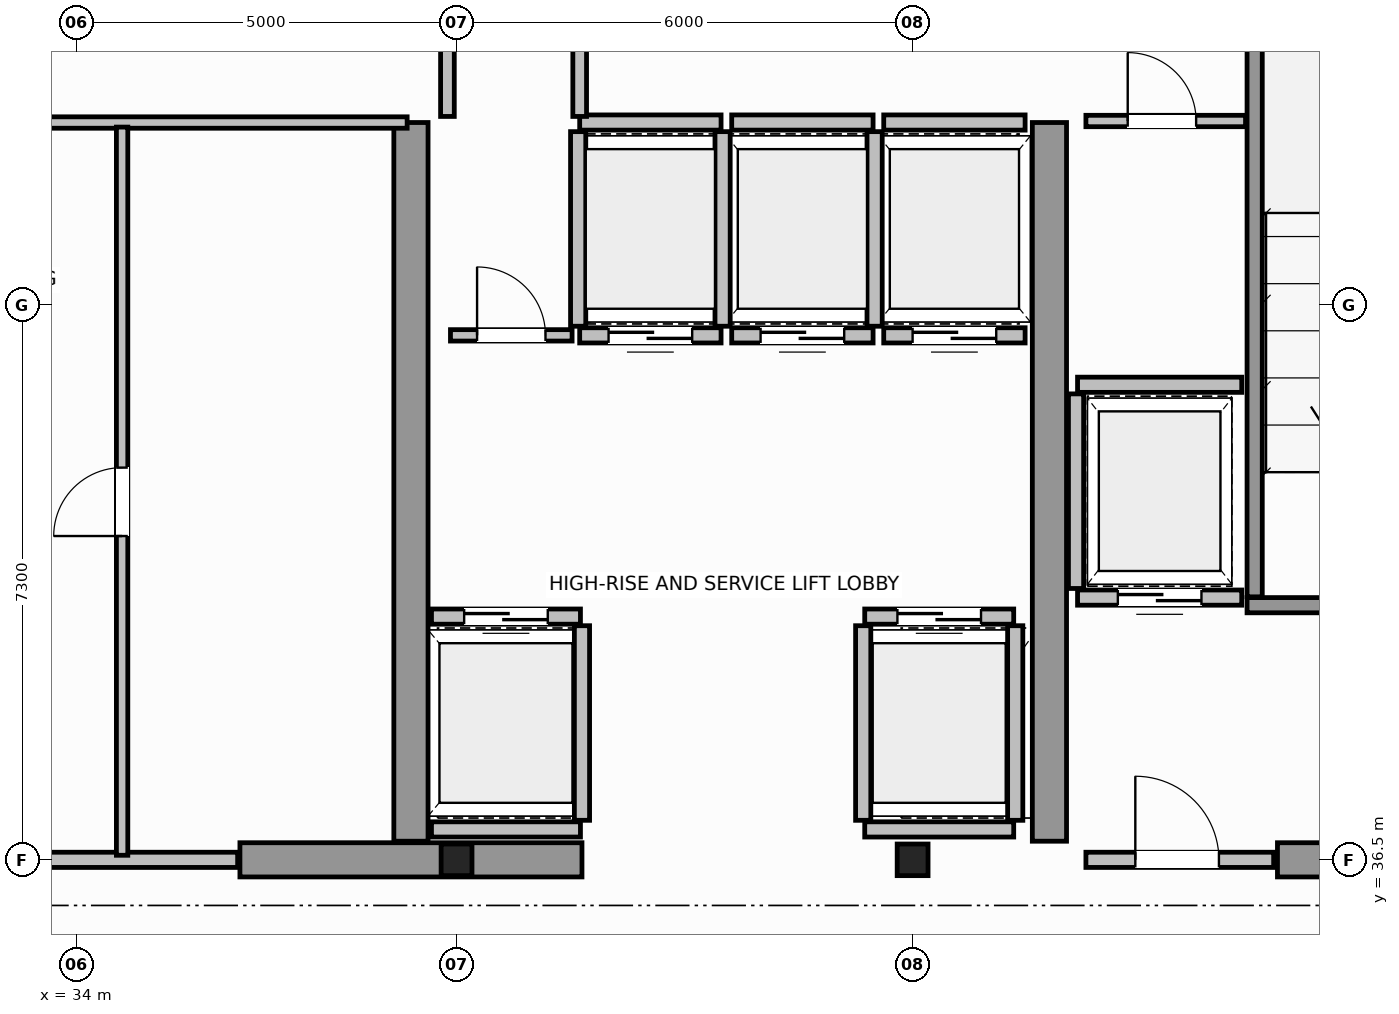
"""IFC4 building model, lengths in metres.
Left out: names, types, materials, properties, quantities, classifications, styles, units other than length and angle.
Written with IfcOpenShell. Run it as: python <this file> out.ifc"""

import sys

from ifc_helpers import new_model, si_unit, direction, frame, frame_2d, origin, origin_2d, place, context, subcontext, project, spatial, rectangle, i_section, extrude, source, transform, mapped, element, fill, save


model = new_model("IFC4")
c1 = context("Model", 3, precision=1e-05, world=origin(), true_north=direction((0.0, 1.0)))
c2 = subcontext(c1, "Body", "Model", "MODEL_VIEW")
j1 = project(units=[si_unit("LENGTHUNIT", "METRE"), si_unit("PLANEANGLEUNIT", "RADIAN")], contexts=[c1])
p1 = place(None, origin())
s1 = spatial("IfcSite", under=j1, at=p1, CompositionType="ELEMENT")
p2 = place(p1, origin())
s2 = spatial("IfcBuilding", under=s1, at=p2, CompositionType="ELEMENT")
p3 = place(p2, frame((0.0, 0.0, 276.4)))
s3 = spatial("IfcBuildingStorey", under=s2, at=p3, CompositionType="ELEMENT", Elevation=276.4)
m1 = source(origin(), c2, "Body", "SweptSolid", [
    extrude(i_section(OverallWidth=0.406, OverallDepth=0.416, WebThickness=0.03, FlangeThickness=0.042, FilletRadius=0.015, at=origin_2d()), origin(), (0.0, 0.0, 1.0), 3.8),
])
for number, where, z_axis, x_axis in (
    (1, (39.0, 36.5, 0.0), (0.0, 0.0, 1.0), (1.0, 0.0, 0.0)),
    (2, (45.0, 36.5, 0.0), (0.0, 0.0, 1.0), (1.0, 0.0, 0.0)),
):
    element("IfcColumn", number, at=place(p3, frame(where, z_axis=z_axis, x_axis=x_axis)), inside=s3, PredefinedType="COLUMN", context=c2, shape_type="MappedRepresentation", body=[
        mapped(m1, transform((0.0, 0.0, 0.0), scale=1.0)),
    ])
p4 = place(p3, frame((36.15, 36.5, 0.0), z_axis=(0.0, 0.0, 1.0), x_axis=(1.0, 0.0, 0.0)))
e3 = element("IfcWall", 3, at=p4, inside=s3, PredefinedType="SHEAR", context=c2, shape_type="SweptSolid", body=[
    extrude(rectangle(XDim=4.5, YDim=0.45, at=frame_2d((2.25, 0.0))), origin(), (0.0, 0.0, 1.0), 3.8),
])
p5 = place(p3, frame((49.8, 36.5, 0.0), z_axis=(0.0, 0.0, 1.0), x_axis=(1.0, 0.0, 0.0)))
e4 = element("IfcWall", 4, at=p5, inside=s3, PredefinedType="SHEAR", context=c2, shape_type="SweptSolid", body=[
    extrude(rectangle(XDim=3.955, YDim=0.45, at=frame_2d((1.978, 0.0))), origin(), (0.0, 0.0, 1.0), 2.58),
])
for number, where, z_axis, x_axis in (
    (5, (38.4, 36.745, 0.0), (0.0, 0.0, 1.0), (0.0, 1.0, 0.0)),
    (6, (46.8, 36.745, 0.0), (0.0, 0.0, 1.0), (0.0, 1.0, 0.0)),
):
    element("IfcWall", number, at=place(p3, frame(where, z_axis=z_axis, x_axis=x_axis)), inside=s3, PredefinedType="SHEAR", context=c2, shape_type="SweptSolid", body=[
        extrude(rectangle(XDim=9.455, YDim=0.45, at=frame_2d((4.728, 0.0))), origin(), (0.0, 0.0, 1.0), 3.8),
    ])
p6 = place(p3, frame((49.4, 39.85, 0.0), z_axis=(0.0, 0.0, 1.0), x_axis=(1.0, 0.0, 0.0)))
e7 = element("IfcWall", 7, at=p6, inside=s3, PredefinedType="SOLIDWALL", context=c2, shape_type="SweptSolid", body=[
    extrude(rectangle(XDim=4.375, YDim=0.2, at=frame_2d((2.188, 0.0))), origin(), (0.0, 0.0, 1.0), 3.8),
])
p7 = place(p6, frame((1.325, 0.0, 0.0)))
e8 = element("IfcOpeningElement", 8, at=p7, cuts=e7, PredefinedType="OPENING", context=c2, shape_type="SweptSolid", body=[
    extrude(rectangle(XDim=1.1, YDim=2.15, at=frame_2d((0.55, 1.075))), frame((0.0, 0.11, 0.0), z_axis=(0.0, -1.0, 0.0), x_axis=(1.0, 0.0, 0.0)), (0.0, 0.0, 1.0), 0.22),
])
p8 = place(p3, frame((49.5, 39.96, 0.0), z_axis=(0.0, 0.0, 1.0), x_axis=(0.0, 1.0, 0.0)))
e9 = element("IfcWall", 9, at=p8, inside=s3, PredefinedType="SOLIDWALL", context=c2, shape_type="SweptSolid", body=[
    extrude(rectangle(XDim=9.93, YDim=0.2, at=frame_2d((4.965, 0.0))), origin(), (0.0, 0.0, 1.0), 3.8),
])
p9 = place(p3, frame((47.28, 36.5, 0.0), z_axis=(0.0, 0.0, 1.0), x_axis=(1.0, 0.0, 0.0)))
e10 = element("IfcWall", 10, at=p9, inside=s3, PredefinedType="SOLIDWALL", context=c2, shape_type="SweptSolid", body=[
    extrude(rectangle(XDim=2.47, YDim=0.2, at=frame_2d((1.235, 0.0))), origin(), (0.0, 0.0, 1.0), 2.57),
])
p10 = place(p9, frame((0.65, 0.0, 0.0)))
e11 = element("IfcOpeningElement", 11, at=p10, cuts=e10, PredefinedType="OPENING", context=c2, shape_type="SweptSolid", body=[
    extrude(rectangle(XDim=1.1, YDim=2.15, at=frame_2d((0.55, 1.075))), frame((0.0, 0.11, 0.0), z_axis=(0.0, -1.0, 0.0), x_axis=(1.0, 0.0, 0.0)), (0.0, 0.0, 1.0), 0.22),
])
p11 = place(p3, frame((38.67, 39.7, 0.0), z_axis=(0.0, 0.0, 1.0), x_axis=(1.0, 0.0, 0.0)))
e12 = element("IfcWall", 12, at=p11, inside=s3, PredefinedType="SOLIDWALL", context=c2, shape_type="SweptSolid", body=[
    extrude(rectangle(XDim=1.96, YDim=0.2, at=frame_2d((0.98, 0.0))), origin(), (0.0, 0.0, 1.0), 3.58),
])
p12 = place(p11, frame((0.43, 0.0, 0.0)))
e13 = element("IfcOpeningElement", 13, at=p12, cuts=e12, PredefinedType="OPENING", context=c2, shape_type="SweptSolid", body=[
    extrude(rectangle(XDim=1.1, YDim=2.15, at=frame_2d((0.55, 1.075))), frame((0.0, 0.11, 0.0), z_axis=(0.0, -1.0, 0.0), x_axis=(1.0, 0.0, 0.0)), (0.0, 0.0, 1.0), 0.22),
])
p13 = place(p3, frame((38.67, 36.9, 0.0), z_axis=(0.0, 0.0, 1.0), x_axis=(1.0, 0.0, 0.0)))
e14 = element("IfcWall", 14, at=p13, inside=s3, PredefinedType="SOLIDWALL", context=c2, shape_type="SweptSolid", body=[
    extrude(rectangle(XDim=1.96, YDim=0.2, at=frame_2d((0.98, 0.0))), origin(), (0.0, 0.0, 1.0), 3.58),
])
p14 = place(p3, frame((40.65, 37.02, 0.0), z_axis=(0.0, 0.0, 1.0), x_axis=(0.0, 1.0, 0.0)))
e15 = element("IfcWall", 15, at=p14, inside=s3, PredefinedType="SOLIDWALL", context=c2, shape_type="SweptSolid", body=[
    extrude(rectangle(XDim=2.56, YDim=0.2, at=frame_2d((1.28, 0.0))), origin(), (0.0, 0.0, 1.0), 3.58),
])
p15 = place(p3, frame((44.37, 39.7, 0.0), z_axis=(0.0, 0.0, 1.0), x_axis=(1.0, 0.0, 0.0)))
e16 = element("IfcWall", 16, at=p15, inside=s3, PredefinedType="SOLIDWALL", context=c2, shape_type="SweptSolid", body=[
    extrude(rectangle(XDim=1.96, YDim=0.2, at=frame_2d((0.98, 0.0))), origin(), (0.0, 0.0, 1.0), 3.58),
])
p16 = place(p15, frame((0.43, 0.0, 0.0)))
e17 = element("IfcOpeningElement", 17, at=p16, cuts=e16, PredefinedType="OPENING", context=c2, shape_type="SweptSolid", body=[
    extrude(rectangle(XDim=1.1, YDim=2.15, at=frame_2d((0.55, 1.075))), frame((0.0, 0.11, 0.0), z_axis=(0.0, -1.0, 0.0), x_axis=(1.0, 0.0, 0.0)), (0.0, 0.0, 1.0), 0.22),
])
p17 = place(p3, frame((44.37, 36.9, 0.0), z_axis=(0.0, 0.0, 1.0), x_axis=(1.0, 0.0, 0.0)))
e18 = element("IfcWall", 18, at=p17, inside=s3, PredefinedType="SOLIDWALL", context=c2, shape_type="SweptSolid", body=[
    extrude(rectangle(XDim=1.96, YDim=0.2, at=frame_2d((0.98, 0.0))), origin(), (0.0, 0.0, 1.0), 2.57),
])
for number, where, z_axis, x_axis in (
    (19, (44.35, 37.02, 0.0), (0.0, 0.0, 1.0), (0.0, 1.0, 0.0)),
    (20, (46.35, 37.02, 0.0), (0.0, 0.0, 1.0), (0.0, 1.0, 0.0)),
):
    element("IfcWall", number, at=place(p3, frame(where, z_axis=z_axis, x_axis=x_axis)), inside=s3, PredefinedType="SOLIDWALL", context=c2, shape_type="SweptSolid", body=[
        extrude(rectangle(XDim=2.56, YDim=0.2, at=frame_2d((1.28, 0.0))), origin(), (0.0, 0.0, 1.0), 3.58),
    ])
p18 = place(p3, frame((40.62, 43.4, 0.0), z_axis=(0.0, 0.0, 1.0), x_axis=(1.0, 0.0, 0.0)))
e21 = element("IfcWall", 21, at=p18, inside=s3, PredefinedType="SOLIDWALL", context=c2, shape_type="SweptSolid", body=[
    extrude(rectangle(XDim=1.86, YDim=0.2, at=frame_2d((0.93, 0.0))), origin(), (0.0, 0.0, 1.0), 3.58),
])
p19 = place(p18, frame((0.38, 0.0, 0.0)))
e22 = element("IfcOpeningElement", 22, at=p19, cuts=e21, PredefinedType="OPENING", context=c2, shape_type="SweptSolid", body=[
    extrude(rectangle(XDim=1.1, YDim=2.15, at=frame_2d((0.55, 1.075))), frame((0.0, 0.11, 0.0), z_axis=(0.0, -1.0, 0.0), x_axis=(1.0, 0.0, 0.0)), (0.0, 0.0, 1.0), 0.22),
])
p20 = place(p3, frame((40.62, 46.2, 0.0), z_axis=(0.0, 0.0, 1.0), x_axis=(1.0, 0.0, 0.0)))
e23 = element("IfcWall", 23, at=p20, inside=s3, PredefinedType="SOLIDWALL", context=c2, shape_type="SweptSolid", body=[
    extrude(rectangle(XDim=1.86, YDim=0.2, at=frame_2d((0.93, 0.0))), origin(), (0.0, 0.0, 1.0), 3.58),
])
for number, where, z_axis, x_axis in (
    (24, (40.6, 43.52, 0.0), (0.0, 0.0, 1.0), (0.0, 1.0, 0.0)),
    (25, (42.5, 43.52, 0.0), (0.0, 0.0, 1.0), (0.0, 1.0, 0.0)),
):
    element("IfcWall", number, at=place(p3, frame(where, z_axis=z_axis, x_axis=x_axis)), inside=s3, PredefinedType="SOLIDWALL", context=c2, shape_type="SweptSolid", body=[
        extrude(rectangle(XDim=2.56, YDim=0.2, at=frame_2d((1.28, 0.0))), origin(), (0.0, 0.0, 1.0), 3.58),
    ])
p21 = place(p3, frame((42.62, 43.4, 0.0), z_axis=(0.0, 0.0, 1.0), x_axis=(1.0, 0.0, 0.0)))
e26 = element("IfcWall", 26, at=p21, inside=s3, PredefinedType="SOLIDWALL", context=c2, shape_type="SweptSolid", body=[
    extrude(rectangle(XDim=1.86, YDim=0.2, at=frame_2d((0.93, 0.0))), origin(), (0.0, 0.0, 1.0), 3.58),
])
p22 = place(p21, frame((0.38, 0.0, 0.0)))
e27 = element("IfcOpeningElement", 27, at=p22, cuts=e26, PredefinedType="OPENING", context=c2, shape_type="SweptSolid", body=[
    extrude(rectangle(XDim=1.1, YDim=2.15, at=frame_2d((0.55, 1.075))), frame((0.0, 0.11, 0.0), z_axis=(0.0, -1.0, 0.0), x_axis=(1.0, 0.0, 0.0)), (0.0, 0.0, 1.0), 0.22),
])
p23 = place(p3, frame((42.62, 46.2, 0.0), z_axis=(0.0, 0.0, 1.0), x_axis=(1.0, 0.0, 0.0)))
e28 = element("IfcWall", 28, at=p23, inside=s3, PredefinedType="SOLIDWALL", context=c2, shape_type="SweptSolid", body=[
    extrude(rectangle(XDim=1.86, YDim=0.2, at=frame_2d((0.93, 0.0))), origin(), (0.0, 0.0, 1.0), 3.58),
])
p24 = place(p3, frame((44.5, 43.52, 0.0), z_axis=(0.0, 0.0, 1.0), x_axis=(0.0, 1.0, 0.0)))
e29 = element("IfcWall", 29, at=p24, inside=s3, PredefinedType="SOLIDWALL", context=c2, shape_type="SweptSolid", body=[
    extrude(rectangle(XDim=2.56, YDim=0.2, at=frame_2d((1.28, 0.0))), origin(), (0.0, 0.0, 1.0), 3.58),
])
p25 = place(p3, frame((44.62, 43.4, 0.0), z_axis=(0.0, 0.0, 1.0), x_axis=(1.0, 0.0, 0.0)))
e30 = element("IfcWall", 30, at=p25, inside=s3, PredefinedType="SOLIDWALL", context=c2, shape_type="SweptSolid", body=[
    extrude(rectangle(XDim=1.86, YDim=0.2, at=frame_2d((0.93, 0.0))), origin(), (0.0, 0.0, 1.0), 3.58),
])
p26 = place(p25, frame((0.38, 0.0, 0.0)))
e31 = element("IfcOpeningElement", 31, at=p26, cuts=e30, PredefinedType="OPENING", context=c2, shape_type="SweptSolid", body=[
    extrude(rectangle(XDim=1.1, YDim=2.15, at=frame_2d((0.55, 1.075))), frame((0.0, 0.11, 0.0), z_axis=(0.0, -1.0, 0.0), x_axis=(1.0, 0.0, 0.0)), (0.0, 0.0, 1.0), 0.22),
])
p27 = place(p3, frame((44.62, 46.2, 0.0), z_axis=(0.0, 0.0, 1.0), x_axis=(1.0, 0.0, 0.0)))
e32 = element("IfcWall", 32, at=p27, inside=s3, PredefinedType="SOLIDWALL", context=c2, shape_type="SweptSolid", body=[
    extrude(rectangle(XDim=1.86, YDim=0.2, at=frame_2d((0.93, 0.0))), origin(), (0.0, 0.0, 1.0), 3.58),
])
p28 = place(p3, frame((47.17, 39.95, 0.0), z_axis=(0.0, 0.0, 1.0), x_axis=(1.0, 0.0, 0.0)))
e33 = element("IfcWall", 33, at=p28, inside=s3, PredefinedType="SOLIDWALL", context=c2, shape_type="SweptSolid", body=[
    extrude(rectangle(XDim=2.16, YDim=0.2, at=frame_2d((1.08, 0.0))), origin(), (0.0, 0.0, 1.0), 3.58),
])
p29 = place(p28, frame((0.53, 0.0, 0.0)))
e34 = element("IfcOpeningElement", 34, at=p29, cuts=e33, PredefinedType="OPENING", context=c2, shape_type="SweptSolid", body=[
    extrude(rectangle(XDim=1.1, YDim=2.15, at=frame_2d((0.55, 1.075))), frame((0.0, 0.11, 0.0), z_axis=(0.0, -1.0, 0.0), x_axis=(1.0, 0.0, 0.0)), (0.0, 0.0, 1.0), 0.22),
])
p30 = place(p3, frame((47.17, 42.75, 0.0), z_axis=(0.0, 0.0, 1.0), x_axis=(1.0, 0.0, 0.0)))
e35 = element("IfcWall", 35, at=p30, inside=s3, PredefinedType="SOLIDWALL", context=c2, shape_type="SweptSolid", body=[
    extrude(rectangle(XDim=2.16, YDim=0.2, at=frame_2d((1.08, 0.0))), origin(), (0.0, 0.0, 1.0), 3.58),
])
p31 = place(p3, frame((47.15, 40.07, 0.0), z_axis=(0.0, 0.0, 1.0), x_axis=(0.0, 1.0, 0.0)))
e36 = element("IfcWall", 36, at=p31, inside=s3, PredefinedType="SOLIDWALL", context=c2, shape_type="SweptSolid", body=[
    extrude(rectangle(XDim=2.56, YDim=0.2, at=frame_2d((1.28, 0.0))), origin(), (0.0, 0.0, 1.0), 3.58),
])
p32 = place(p3, frame((32.08, 36.5, 0.0), z_axis=(0.0, 0.0, 1.0), x_axis=(1.0, 0.0, 0.0)))
e37 = element("IfcWall", 37, at=p32, inside=s3, PredefinedType="SOLIDWALL", context=c2, shape_type="SweptSolid", body=[
    extrude(rectangle(XDim=4.04, YDim=0.2, at=frame_2d((2.02, 0.0))), origin(), (0.0, 0.0, 1.0), 3.02),
])
p33 = place(p32, frame((0.45, 0.0, 0.0)))
e38 = element("IfcOpeningElement", 38, at=p33, cuts=e37, PredefinedType="OPENING", context=c2, shape_type="SweptSolid", body=[
    extrude(rectangle(XDim=1.1, YDim=2.15, at=frame_2d((0.55, 1.075))), frame((0.0, 0.11, 0.0), z_axis=(0.0, -1.0, 0.0), x_axis=(1.0, 0.0, 0.0)), (0.0, 0.0, 1.0), 0.22),
])
p34 = place(p3, frame((29.85, 46.2, 0.0), z_axis=(0.0, 0.0, 1.0), x_axis=(1.0, 0.0, 0.0)))
e39 = element("IfcWall", 39, at=p34, inside=s3, PredefinedType="PARTITIONING", context=c2, shape_type="SweptSolid", body=[
    extrude(rectangle(XDim=8.5, YDim=0.15, at=frame_2d((4.25, 0.0))), origin(), (0.0, 0.0, 1.0), 3.58),
])
p35 = place(p3, frame((34.6, 36.56, 0.0), z_axis=(0.0, 0.0, 1.0), x_axis=(0.0, 1.0, 0.0)))
e40 = element("IfcWall", 40, at=p35, inside=s3, PredefinedType="PARTITIONING", context=c2, shape_type="SweptSolid", body=[
    extrude(rectangle(XDim=9.58, YDim=0.15, at=frame_2d((4.79, 0.0))), origin(), (0.0, 0.0, 1.0), 3.58),
])
p36 = place(p35, frame((4.2, 0.0, 0.0)))
e41 = element("IfcOpeningElement", 41, at=p36, cuts=e40, PredefinedType="OPENING", context=c2, shape_type="SweptSolid", body=[
    extrude(rectangle(XDim=0.9, YDim=2.1, at=frame_2d((0.45, 1.05))), frame((0.0, 0.085, 0.0), z_axis=(0.0, -1.0, 0.0), x_axis=(1.0, 0.0, 0.0)), (0.0, 0.0, 1.0), 0.17),
])
p37 = place(p3, frame((47.28, 46.22, 0.0), z_axis=(0.0, 0.0, 1.0), x_axis=(1.0, 0.0, 0.0)))
e42 = element("IfcWall", 42, at=p37, inside=s3, PredefinedType="PARTITIONING", context=c2, shape_type="SweptSolid", body=[
    extrude(rectangle(XDim=2.1, YDim=0.15, at=frame_2d((1.05, 0.0))), origin(), (0.0, 0.0, 1.0), 3.58),
])
p38 = place(p37, frame((0.55, 0.0, 0.0)))
e43 = element("IfcOpeningElement", 43, at=p38, cuts=e42, PredefinedType="OPENING", context=c2, shape_type="SweptSolid", body=[
    extrude(rectangle(XDim=0.9, YDim=2.1, at=frame_2d((0.45, 1.05))), frame((0.0, 0.085, 0.0), z_axis=(0.0, -1.0, 0.0), x_axis=(1.0, 0.0, 0.0)), (0.0, 0.0, 1.0), 0.17),
])
p39 = place(p3, frame((38.92, 43.4, 0.0), z_axis=(0.0, 0.0, 1.0), x_axis=(1.0, 0.0, 0.0)))
e44 = element("IfcWall", 44, at=p39, inside=s3, PredefinedType="PARTITIONING", context=c2, shape_type="SweptSolid", body=[
    extrude(rectangle(XDim=1.6, YDim=0.15, at=frame_2d((0.8, 0.0))), origin(), (0.0, 0.0, 1.0), 3.58),
])
p40 = place(p39, frame((0.35, 0.0, 0.0)))
e45 = element("IfcOpeningElement", 45, at=p40, cuts=e44, PredefinedType="OPENING", context=c2, shape_type="SweptSolid", body=[
    extrude(rectangle(XDim=0.9, YDim=2.1, at=frame_2d((0.45, 1.05))), frame((0.0, 0.085, 0.0), z_axis=(0.0, -1.0, 0.0), x_axis=(1.0, 0.0, 0.0)), (0.0, 0.0, 1.0), 0.17),
])
p41 = place(p3, frame((38.88, 46.28, 0.0), z_axis=(0.0, 0.0, 1.0), x_axis=(0.0, 1.0, 0.0)))
e46 = element("IfcWall", 46, at=p41, inside=s3, PredefinedType="PLUMBINGWALL", context=c2, shape_type="SweptSolid", body=[
    extrude(rectangle(XDim=1.94, YDim=0.18, at=frame_2d((0.97, 0.0))), origin(), (0.0, 0.0, 1.0), 3.58),
])
p42 = place(p3, frame((40.62, 46.28, 0.0), z_axis=(0.0, 0.0, 1.0), x_axis=(0.0, 1.0, 0.0)))
e47 = element("IfcWall", 47, at=p42, inside=s3, PredefinedType="PLUMBINGWALL", context=c2, shape_type="SweptSolid", body=[
    extrude(rectangle(XDim=2.0, YDim=0.18, at=frame_2d((1.0, 0.0))), origin(), (0.0, 0.0, 1.0), 3.58),
])
m2 = source(origin(), c2, "Body", "SweptSolid", [
    extrude(rectangle(XDim=1.1, YDim=2.15, at=frame_2d((0.55, 1.075))), frame((0.0, 0.025, 0.0), z_axis=(0.0, -1.0, 0.0), x_axis=(1.0, 0.0, 0.0)), (0.0, 0.0, 1.0), 0.05),
])
p43 = place(p10, origin())
e48 = element("IfcDoor", 48, at=p43, inside=s3, OperationType="SINGLE_SWING_LEFT", PredefinedType="DOOR", context=c2, shape_type="MappedRepresentation", body=[
    mapped(m2, transform((0.0, 0.0, 0.0), scale=1.0)),
])
fill(e11, e48)
p44 = place(p12, origin())
e49 = element("IfcDoor", 49, at=p44, inside=s3, OperationType="DOUBLE_DOOR_SLIDING", PredefinedType="DOOR", context=c2, shape_type="MappedRepresentation", body=[
    mapped(m2, transform((0.0, 0.0, 0.0), scale=1.0)),
])
fill(e13, e49)
p45 = place(p16, origin())
e50 = element("IfcDoor", 50, at=p45, inside=s3, OperationType="DOUBLE_DOOR_SLIDING", PredefinedType="DOOR", context=c2, shape_type="MappedRepresentation", body=[
    mapped(m2, transform((0.0, 0.0, 0.0), scale=1.0)),
])
fill(e17, e50)
p46 = place(p19, origin())
e51 = element("IfcDoor", 51, at=p46, inside=s3, OperationType="DOUBLE_DOOR_SLIDING", PredefinedType="DOOR", context=c2, shape_type="MappedRepresentation", body=[
    mapped(m2, transform((0.0, 0.0, 0.0), scale=1.0)),
])
fill(e22, e51)
p47 = place(p22, origin())
e52 = element("IfcDoor", 52, at=p47, inside=s3, OperationType="DOUBLE_DOOR_SLIDING", PredefinedType="DOOR", context=c2, shape_type="MappedRepresentation", body=[
    mapped(m2, transform((0.0, 0.0, 0.0), scale=1.0)),
])
fill(e27, e52)
p48 = place(p26, origin())
e53 = element("IfcDoor", 53, at=p48, inside=s3, OperationType="DOUBLE_DOOR_SLIDING", PredefinedType="DOOR", context=c2, shape_type="MappedRepresentation", body=[
    mapped(m2, transform((0.0, 0.0, 0.0), scale=1.0)),
])
fill(e31, e53)
p49 = place(p29, origin())
e54 = element("IfcDoor", 54, at=p49, inside=s3, OperationType="DOUBLE_DOOR_SLIDING", PredefinedType="DOOR", context=c2, shape_type="MappedRepresentation", body=[
    mapped(m2, transform((0.0, 0.0, 0.0), scale=1.0)),
])
fill(e34, e54)
m3 = source(origin(), c2, "Body", "SweptSolid", [
    extrude(rectangle(XDim=0.9, YDim=2.1, at=frame_2d((0.45, 1.05))), frame((0.0, 0.025, 0.0), z_axis=(0.0, -1.0, 0.0), x_axis=(1.0, 0.0, 0.0)), (0.0, 0.0, 1.0), 0.05),
])
p50 = place(p36, origin())
e55 = element("IfcDoor", 55, at=p50, inside=s3, OperationType="SINGLE_SWING_RIGHT", PredefinedType="DOOR", context=c2, shape_type="MappedRepresentation", body=[
    mapped(m3, transform((0.0, 0.0, 0.0), scale=1.0)),
])
fill(e41, e55)
p51 = place(p38, origin())
e56 = element("IfcDoor", 56, at=p51, inside=s3, OperationType="SINGLE_SWING_RIGHT", PredefinedType="DOOR", context=c2, shape_type="MappedRepresentation", body=[
    mapped(m3, transform((0.0, 0.0, 0.0), scale=1.0)),
])
fill(e43, e56)
p52 = place(p40, origin())
e57 = element("IfcDoor", 57, at=p52, inside=s3, OperationType="SINGLE_SWING_LEFT", PredefinedType="DOOR", context=c2, shape_type="MappedRepresentation", body=[
    mapped(m3, transform((0.0, 0.0, 0.0), scale=1.0)),
])
fill(e45, e57)
save(model, sys.argv[1])
